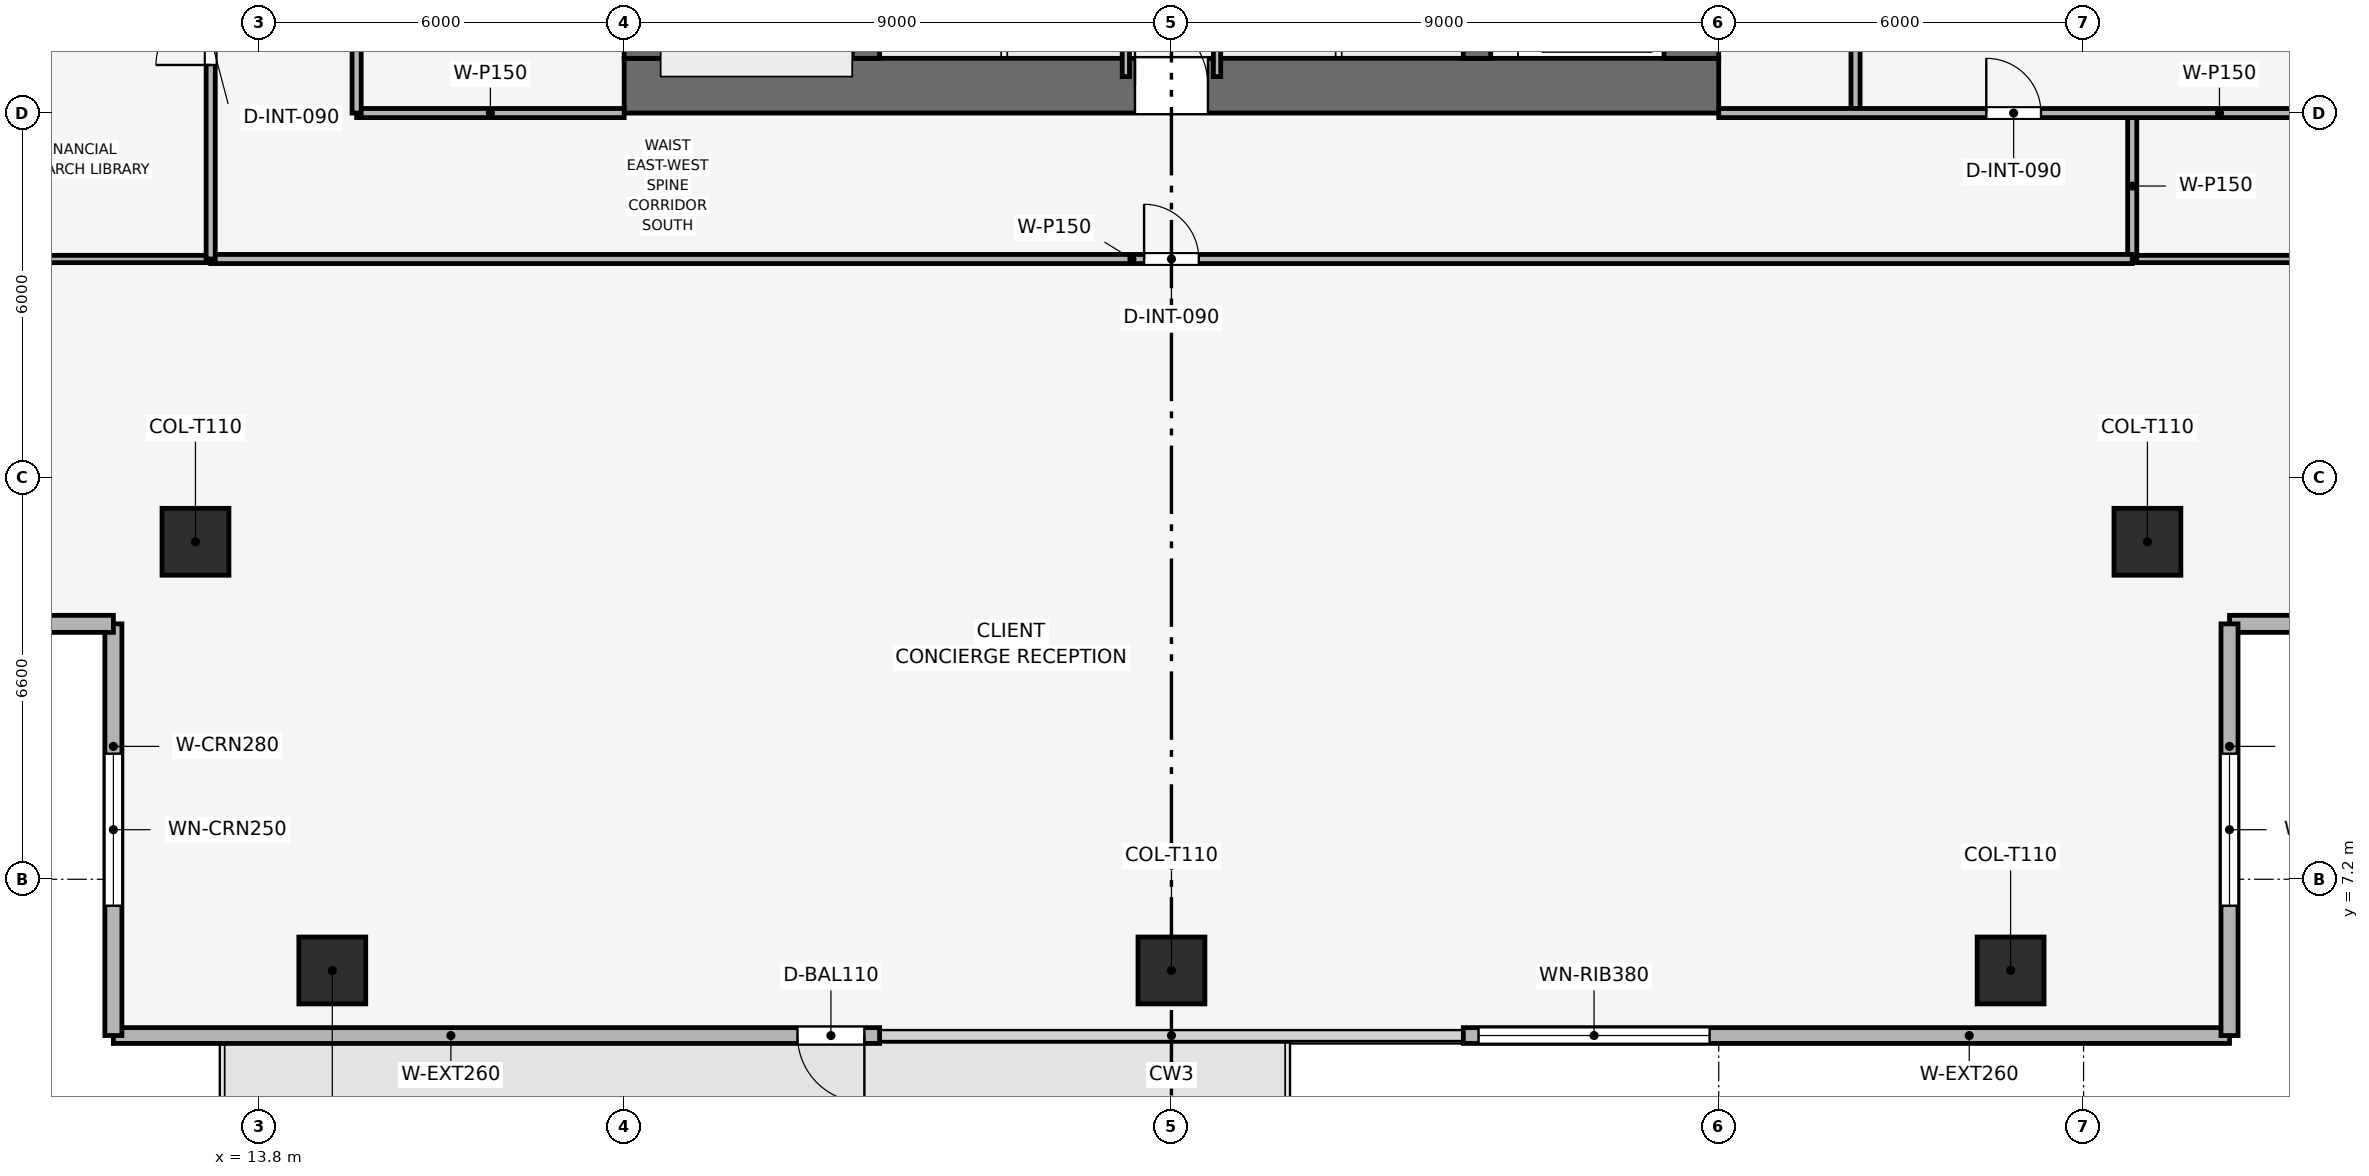
"""IFC4 building model, lengths in metres.
Left out: names, types, materials, properties, quantities, classifications, styles, units other than length and angle.
Written with IfcOpenShell. Run it as: python <this file> out.ifc"""

import sys

from ifc_helpers import new_model, si_unit, direction, frame, frame_2d, origin, origin_2d, place, context, subcontext, project, spatial, rectangle, extrude, element, fill, save


model = new_model("IFC4")
c1 = context("Model", 3, precision=1e-05, world=origin(), true_north=direction((0.0, 1.0)))
c2 = subcontext(c1, "Body", "Model", "MODEL_VIEW")
j1 = project(units=[si_unit("LENGTHUNIT", "METRE"), si_unit("PLANEANGLEUNIT", "RADIAN")], contexts=[c1])
p1 = place(None, origin())
s1 = spatial("IfcSite", under=j1, at=p1, CompositionType="ELEMENT")
p2 = place(p1, origin())
s2 = spatial("IfcBuilding", under=s1, at=p2, CompositionType="ELEMENT")
p3 = place(p2, frame((0.0, 0.0, 172.05)))
s3 = spatial("IfcBuildingStorey", under=s2, at=p3, CompositionType="ELEMENT", Elevation=172.05)
p4 = place(p3, frame((19.8, 20.25, 0.0), z_axis=(0.0, 0.0, 1.0), x_axis=(1.0, 0.0, 0.0)))
e1 = element("IfcWall", 1, at=p4, inside=s3, PredefinedType="SHEAR", context=c2, shape_type="SweptSolid", body=[
    extrude(rectangle(XDim=18.0, YDim=0.9, at=frame_2d((9.0, 0.0))), origin(), (0.0, 0.0, 1.0), 3.75),
])
p5 = place(p4, frame((8.4, 0.0, 0.0)))
e2 = element("IfcOpeningElement", 2, at=p5, cuts=e1, PredefinedType="OPENING", context=c2, shape_type="SweptSolid", body=[
    extrude(rectangle(XDim=1.2, YDim=2.2, at=frame_2d((0.6, 1.1))), frame((0.0, 0.46, 0.0), z_axis=(0.0, -1.0, 0.0), x_axis=(1.0, 0.0, 0.0)), (0.0, 0.0, 1.0), 0.92),
])
p6 = place(p3, frame((20.25, 20.7, 0.0), z_axis=(0.0, 0.0, 1.0), x_axis=(0.0, 1.0, 0.0)))
e3 = element("IfcWall", 3, at=p6, inside=s3, PredefinedType="SHEAR", context=c2, shape_type="SweptSolid", body=[
    extrude(rectangle(XDim=16.2, YDim=0.9, at=frame_2d((8.1, 0.0))), origin(), (0.0, 0.0, 1.0), 3.75),
])
p7 = place(p6, frame((10.1, 0.0, 0.0)))
e4 = element("IfcOpeningElement", 4, at=p7, cuts=e3, PredefinedType="OPENING", context=c2, shape_type="SweptSolid", body=[
    extrude(rectangle(XDim=1.1, YDim=2.15, at=frame_2d((0.55, 1.075))), frame((0.0, 0.46, 0.0), z_axis=(0.0, -1.0, 0.0), x_axis=(1.0, 0.0, 0.0)), (0.0, 0.0, 1.0), 0.92),
])
p8 = place(p3, frame((37.35, 20.7, 0.0), z_axis=(0.0, 0.0, 1.0), x_axis=(0.0, 1.0, 0.0)))
e5 = element("IfcWall", 5, at=p8, inside=s3, PredefinedType="SHEAR", context=c2, shape_type="SweptSolid", body=[
    extrude(rectangle(XDim=16.2, YDim=0.9, at=frame_2d((8.1, 0.0))), origin(), (0.0, 0.0, 1.0), 3.75),
])
p9 = place(p8, frame((4.6, 0.0, 0.0)))
e6 = element("IfcOpeningElement", 6, at=p9, cuts=e5, PredefinedType="OPENING", context=c2, shape_type="SweptSolid", body=[
    extrude(rectangle(XDim=1.1, YDim=2.15, at=frame_2d((0.55, 1.075))), frame((0.0, 0.46, 0.0), z_axis=(0.0, -1.0, 0.0), x_axis=(1.0, 0.0, 0.0)), (0.0, 0.0, 1.0), 0.92),
])
for number, where, z_axis, x_axis in (
    (7, (23.775, 20.7, 0.0), (0.0, 0.0, 1.0), (0.0, 1.0, 0.0)),
    (8, (33.825, 20.7, 0.0), (0.0, 0.0, 1.0), (0.0, 1.0, 0.0)),
):
    element("IfcWall", number, at=place(p3, frame(where, z_axis=z_axis, x_axis=x_axis)), inside=s3, PredefinedType="SHEAR", context=c2, shape_type="SweptSolid", body=[
        extrude(rectangle(XDim=16.2, YDim=0.45, at=frame_2d((8.1, 0.0))), origin(), (0.0, 0.0, 1.0), 3.75),
    ])
for number, where, z_axis, x_axis in (
    (9, (15.0, 5.7, 0.003), (0.0, 0.0, 1.0), (1.0, 0.0, 0.0)),
    (10, (28.8, 5.7, 0.003), (0.0, 0.0, 1.0), (1.0, 0.0, 0.0)),
    (11, (42.6, 5.7, 0.003), (0.0, 0.0, 1.0), (1.0, 0.0, 0.0)),
    (12, (12.75, 12.75, 0.003), (0.0, 0.0, 1.0), (1.0, 0.0, 0.0)),
    (13, (44.85, 12.75, 0.003), (0.0, 0.0, 1.0), (1.0, 0.0, 0.0)),
):
    element("IfcColumn", number, at=place(p3, frame(where, z_axis=z_axis, x_axis=x_axis)), inside=s3, PredefinedType="COLUMN", context=c2, shape_type="SweptSolid", body=[
        extrude(rectangle(XDim=1.1, YDim=1.1, at=origin_2d()), origin(), (0.0, 0.0, 1.0), 3.489),
    ])
p10 = place(p3, frame((46.2, 4.63, 0.0), z_axis=(0.0, 0.0, 1.0), x_axis=(-1.0, 0.0, 0.0)))
e14 = element("IfcWall", 14, at=p10, inside=s3, PredefinedType="SOLIDWALL", context=c2, shape_type="SweptSolid", body=[
    extrude(rectangle(XDim=12.6, YDim=0.26, at=frame_2d((6.3, 0.0))), origin(), (0.0, 0.0, 1.0), 3.495),
])
p11 = place(p10, frame((8.55, 0.0, 0.9)))
e15 = element("IfcOpeningElement", 15, at=p11, cuts=e14, PredefinedType="OPENING", context=c2, shape_type="SweptSolid", body=[
    extrude(rectangle(XDim=3.8, YDim=1.9, at=frame_2d((1.9, 0.95))), frame((0.0, 0.14, 0.0), z_axis=(0.0, -1.0, 0.0), x_axis=(1.0, 0.0, 0.0)), (0.0, 0.0, 1.0), 0.28),
])
p12 = place(p3, frame((24.0, 4.63, 0.0), z_axis=(0.0, 0.0, 1.0), x_axis=(-1.0, 0.0, 0.0)))
e16 = element("IfcWall", 16, at=p12, inside=s3, PredefinedType="SOLIDWALL", context=c2, shape_type="SweptSolid", body=[
    extrude(rectangle(XDim=12.6, YDim=0.26, at=frame_2d((6.3, 0.0))), origin(), (0.0, 0.0, 1.0), 3.495),
])
p13 = place(p12, frame((0.25, 0.0, 0.0)))
e17 = element("IfcOpeningElement", 17, at=p13, cuts=e16, PredefinedType="OPENING", context=c2, shape_type="SweptSolid", body=[
    extrude(rectangle(XDim=1.1, YDim=2.2, at=frame_2d((0.55, 1.1))), frame((0.0, 0.14, 0.0), z_axis=(0.0, -1.0, 0.0), x_axis=(1.0, 0.0, 0.0)), (0.0, 0.0, 1.0), 0.28),
])
p14 = place(p3, frame((11.4, 4.63, 0.0), z_axis=(0.0, 0.0, 1.0), x_axis=(0.0, 1.0, 0.0)))
e18 = element("IfcWall", 18, at=p14, inside=s3, PredefinedType="SOLIDWALL", context=c2, shape_type="SweptSolid", body=[
    extrude(rectangle(XDim=6.77, YDim=0.28, at=frame_2d((3.385, 0.0))), origin(), (0.0, 0.0, 1.0), 3.495),
])
p15 = place(p14, frame((2.135, 0.0, 0.9)))
e19 = element("IfcOpeningElement", 19, at=p15, cuts=e18, PredefinedType="OPENING", context=c2, shape_type="SweptSolid", body=[
    extrude(rectangle(XDim=2.5, YDim=1.9, at=frame_2d((1.25, 0.95))), frame((0.0, 0.15, 0.0), z_axis=(0.0, -1.0, 0.0), x_axis=(1.0, 0.0, 0.0)), (0.0, 0.0, 1.0), 0.3),
])
p16 = place(p3, frame((11.4, 11.4, 0.0), z_axis=(0.0, 0.0, 1.0), x_axis=(-1.0, 0.0, 0.0)))
e20 = element("IfcWall", 20, at=p16, inside=s3, PredefinedType="SOLIDWALL", context=c2, shape_type="SweptSolid", body=[
    extrude(rectangle(XDim=6.77, YDim=0.28, at=frame_2d((3.385, 0.0))), origin(), (0.0, 0.0, 1.0), 3.495),
])
p17 = place(p16, frame((2.135, 0.0, 0.9)))
e21 = element("IfcOpeningElement", 21, at=p17, cuts=e20, PredefinedType="OPENING", context=c2, shape_type="SweptSolid", body=[
    extrude(rectangle(XDim=2.5, YDim=1.9, at=frame_2d((1.25, 0.95))), frame((0.0, 0.15, 0.0), z_axis=(0.0, -1.0, 0.0), x_axis=(1.0, 0.0, 0.0)), (0.0, 0.0, 1.0), 0.3),
])
p18 = place(p3, frame((52.97, 11.4, 0.0), z_axis=(0.0, 0.0, 1.0), x_axis=(-1.0, 0.0, 0.0)))
e22 = element("IfcWall", 22, at=p18, inside=s3, PredefinedType="SOLIDWALL", context=c2, shape_type="SweptSolid", body=[
    extrude(rectangle(XDim=6.77, YDim=0.28, at=frame_2d((3.385, 0.0))), origin(), (0.0, 0.0, 1.0), 3.495),
])
p19 = place(p18, frame((2.135, 0.0, 0.9)))
e23 = element("IfcOpeningElement", 23, at=p19, cuts=e22, PredefinedType="OPENING", context=c2, shape_type="SweptSolid", body=[
    extrude(rectangle(XDim=2.5, YDim=1.9, at=frame_2d((1.25, 0.95))), frame((0.0, 0.15, 0.0), z_axis=(0.0, -1.0, 0.0), x_axis=(1.0, 0.0, 0.0)), (0.0, 0.0, 1.0), 0.3),
])
p20 = place(p3, frame((46.2, 11.4, 0.0), z_axis=(0.0, 0.0, 1.0), x_axis=(0.0, -1.0, 0.0)))
e24 = element("IfcWall", 24, at=p20, inside=s3, PredefinedType="SOLIDWALL", context=c2, shape_type="SweptSolid", body=[
    extrude(rectangle(XDim=6.77, YDim=0.28, at=frame_2d((3.385, 0.0))), origin(), (0.0, 0.0, 1.0), 3.495),
])
p21 = place(p20, frame((2.135, 0.0, 0.9)))
e25 = element("IfcOpeningElement", 25, at=p21, cuts=e24, PredefinedType="OPENING", context=c2, shape_type="SweptSolid", body=[
    extrude(rectangle(XDim=2.5, YDim=1.9, at=frame_2d((1.25, 0.95))), frame((0.0, 0.15, 0.0), z_axis=(0.0, -1.0, 0.0), x_axis=(1.0, 0.0, 0.0)), (0.0, 0.0, 1.0), 0.3),
])
for number, where, z_axis, x_axis in (
    (26, (28.05, 20.4, 0.0), (0.0, 0.0, 1.0), (0.0, 1.0, 0.0)),
    (27, (29.55, 20.4, 0.0), (0.0, 0.0, 1.0), (0.0, 1.0, 0.0)),
):
    element("IfcWall", number, at=place(p3, frame(where, z_axis=z_axis, x_axis=x_axis)), inside=s3, PredefinedType="PARTITIONING", context=c2, shape_type="SweptSolid", body=[
        extrude(rectangle(XDim=2.75, YDim=0.12, at=frame_2d((1.375, 0.0))), origin(), (0.0, 0.0, 1.0), 3.495),
    ])
p22 = place(p3, frame((15.4, 19.8, 0.0), z_axis=(0.0, 0.0, 1.0), x_axis=(1.0, 0.0, 0.0)))
e28 = element("IfcWall", 28, at=p22, inside=s3, PredefinedType="PARTITIONING", context=c2, shape_type="SweptSolid", body=[
    extrude(rectangle(XDim=4.4, YDim=0.15, at=frame_2d((2.2, 0.0))), origin(), (0.0, 0.0, 1.0), 3.03),
])
p23 = place(p3, frame((15.4, 19.8, 0.0), z_axis=(0.0, 0.0, 1.0), x_axis=(0.0, 1.0, 0.0)))
e29 = element("IfcWall", 29, at=p23, inside=s3, PredefinedType="PARTITIONING", context=c2, shape_type="SweptSolid", body=[
    extrude(rectangle(XDim=10.35, YDim=0.15, at=frame_2d((5.175, 0.0))), origin(), (0.0, 0.0, 1.0), 3.03),
])
p24 = place(p23, frame((1.2, 0.0, 0.0)))
e30 = element("IfcOpeningElement", 30, at=p24, cuts=e29, PredefinedType="OPENING", context=c2, shape_type="SweptSolid", body=[
    extrude(rectangle(XDim=0.9, YDim=2.1, at=frame_2d((0.45, 1.05))), frame((0.0, 0.085, 0.0), z_axis=(0.0, -1.0, 0.0), x_axis=(1.0, 0.0, 0.0)), (0.0, 0.0, 1.0), 0.17),
])
p25 = place(p23, frame((4.7, 0.0, 0.0)))
e31 = element("IfcOpeningElement", 31, at=p25, cuts=e29, PredefinedType="OPENING", context=c2, shape_type="SweptSolid", body=[
    extrude(rectangle(XDim=0.9, YDim=2.1, at=frame_2d((0.45, 1.05))), frame((0.0, 0.085, 0.0), z_axis=(0.0, -1.0, 0.0), x_axis=(1.0, 0.0, 0.0)), (0.0, 0.0, 1.0), 0.17),
])
p26 = place(p23, frame((8.1, 0.0, 0.0)))
e32 = element("IfcOpeningElement", 32, at=p26, cuts=e29, PredefinedType="OPENING", context=c2, shape_type="SweptSolid", body=[
    extrude(rectangle(XDim=0.95, YDim=2.1, at=frame_2d((0.475, 1.05))), frame((0.0, 0.085, 0.0), z_axis=(0.0, -1.0, 0.0), x_axis=(1.0, 0.0, 0.0)), (0.0, 0.0, 1.0), 0.17),
])
p27 = place(p3, frame((40.05, 19.8, 0.0), z_axis=(0.0, 0.0, 1.0), x_axis=(0.0, 1.0, 0.0)))
e33 = element("IfcWall", 33, at=p27, inside=s3, PredefinedType="PARTITIONING", context=c2, shape_type="SweptSolid", body=[
    extrude(rectangle(XDim=7.05, YDim=0.15, at=frame_2d((3.525, 0.0))), origin(), (0.0, 0.0, 1.0), 3.03),
])
p28 = place(p3, frame((4.63, 17.4, 0.0), z_axis=(0.0, 0.0, 1.0), x_axis=(1.0, 0.0, 0.0)))
e34 = element("IfcWall", 34, at=p28, inside=s3, PredefinedType="PARTITIONING", context=c2, shape_type="SweptSolid", body=[
    extrude(rectangle(XDim=8.37, YDim=0.12, at=frame_2d((4.185, 0.0))), origin(), (0.0, 0.0, 1.0), 2.98),
])
p29 = place(p3, frame((44.6, 17.4, 0.0), z_axis=(0.0, 0.0, 1.0), x_axis=(1.0, 0.0, 0.0)))
e35 = element("IfcWall", 35, at=p29, inside=s3, PredefinedType="PARTITIONING", context=c2, shape_type="SweptSolid", body=[
    extrude(rectangle(XDim=8.37, YDim=0.12, at=frame_2d((4.185, 0.0))), origin(), (0.0, 0.0, 1.0), 2.98),
])
p30 = place(p3, frame((44.6, 17.4, 0.0), z_axis=(0.0, 0.0, 1.0), x_axis=(0.0, 1.0, 0.0)))
e36 = element("IfcWall", 36, at=p30, inside=s3, PredefinedType="PARTITIONING", context=c2, shape_type="SweptSolid", body=[
    extrude(rectangle(XDim=2.4, YDim=0.15, at=frame_2d((1.2, 0.0))), origin(), (0.0, 0.0, 1.0), 3.495),
])
p31 = place(p3, frame((37.8, 19.8, 0.0), z_axis=(0.0, 0.0, 1.0), x_axis=(1.0, 0.0, 0.0)))
e37 = element("IfcWall", 37, at=p31, inside=s3, PredefinedType="PARTITIONING", context=c2, shape_type="SweptSolid", body=[
    extrude(rectangle(XDim=15.17, YDim=0.15, at=frame_2d((7.585, 0.0))), origin(), (0.0, 0.0, 1.0), 2.98),
])
p32 = place(p31, frame((4.4, 0.0, 0.0)))
e38 = element("IfcOpeningElement", 38, at=p32, cuts=e37, PredefinedType="OPENING", context=c2, shape_type="SweptSolid", body=[
    extrude(rectangle(XDim=0.9, YDim=2.1, at=frame_2d((0.45, 1.05))), frame((0.0, 0.085, 0.0), z_axis=(0.0, -1.0, 0.0), x_axis=(1.0, 0.0, 0.0)), (0.0, 0.0, 1.0), 0.17),
])
p33 = place(p3, frame((13.0, 17.4, 0.0), z_axis=(0.0, 0.0, 1.0), x_axis=(1.0, 0.0, 0.0)))
e39 = element("IfcWall", 39, at=p33, inside=s3, PredefinedType="PARTITIONING", context=c2, shape_type="SweptSolid", body=[
    extrude(rectangle(XDim=31.6, YDim=0.15, at=frame_2d((15.8, 0.0))), origin(), (0.0, 0.0, 1.0), 3.03),
])
p34 = place(p33, frame((15.35, 0.0, 0.0)))
e40 = element("IfcOpeningElement", 40, at=p34, cuts=e39, PredefinedType="OPENING", context=c2, shape_type="SweptSolid", body=[
    extrude(rectangle(XDim=0.9, YDim=2.1, at=frame_2d((0.45, 1.05))), frame((0.0, 0.085, 0.0), z_axis=(0.0, -1.0, 0.0), x_axis=(1.0, 0.0, 0.0)), (0.0, 0.0, 1.0), 0.17),
])
p35 = place(p3, frame((13.0, 17.4, 0.0), z_axis=(0.0, 0.0, 1.0), x_axis=(0.0, 1.0, 0.0)))
e41 = element("IfcWall", 41, at=p35, inside=s3, PredefinedType="PARTITIONING", context=c2, shape_type="SweptSolid", body=[
    extrude(rectangle(XDim=22.8, YDim=0.15, at=frame_2d((11.4, 0.0))), origin(), (0.0, 0.0, 1.0), 3.03),
])
p36 = place(p35, frame((3.191, 0.0, 0.0)))
e42 = element("IfcOpeningElement", 42, at=p36, cuts=e41, PredefinedType="OPENING", context=c2, shape_type="SweptSolid", body=[
    extrude(rectangle(XDim=0.9, YDim=2.1, at=frame_2d((0.45, 1.05))), frame((0.0, 0.085, 0.0), z_axis=(0.0, -1.0, 0.0), x_axis=(1.0, 0.0, 0.0)), (0.0, 0.0, 1.0), 0.17),
])
p37 = place(p35, frame((6.581, 0.0, 0.0)))
e43 = element("IfcOpeningElement", 43, at=p37, cuts=e41, PredefinedType="OPENING", context=c2, shape_type="SweptSolid", body=[
    extrude(rectangle(XDim=0.9, YDim=2.1, at=frame_2d((0.45, 1.05))), frame((0.0, 0.085, 0.0), z_axis=(0.0, -1.0, 0.0), x_axis=(1.0, 0.0, 0.0)), (0.0, 0.0, 1.0), 0.17),
])
p38 = place(p35, frame((10.878, 0.0, 0.0)))
e44 = element("IfcOpeningElement", 44, at=p38, cuts=e41, PredefinedType="OPENING", context=c2, shape_type="SweptSolid", body=[
    extrude(rectangle(XDim=0.9, YDim=2.1, at=frame_2d((0.45, 1.05))), frame((0.0, 0.085, 0.0), z_axis=(0.0, -1.0, 0.0), x_axis=(1.0, 0.0, 0.0)), (0.0, 0.0, 1.0), 0.17),
])
p39 = place(p35, frame((16.488, 0.0, 0.0)))
e45 = element("IfcOpeningElement", 45, at=p39, cuts=e41, PredefinedType="OPENING", context=c2, shape_type="SweptSolid", body=[
    extrude(rectangle(XDim=0.9, YDim=2.1, at=frame_2d((0.45, 1.05))), frame((0.0, 0.085, 0.0), z_axis=(0.0, -1.0, 0.0), x_axis=(1.0, 0.0, 0.0)), (0.0, 0.0, 1.0), 0.17),
])
p40 = place(p13, origin())
e46 = element("IfcDoor", 46, at=p40, inside=s3, OperationType="SINGLE_SWING_LEFT", PredefinedType="DOOR", context=c2, shape_type="SweptSolid", body=[
    extrude(rectangle(XDim=1.1, YDim=2.2, at=frame_2d((0.55, 1.1))), frame((0.0, 0.025, 0.0), z_axis=(0.0, -1.0, 0.0), x_axis=(1.0, 0.0, 0.0)), (0.0, 0.0, 1.0), 0.05),
])
fill(e17, e46)
p41 = place(p11, origin())
e47 = element("IfcWindow", 47, at=p41, inside=s3, PartitioningType="SINGLE_PANEL", PredefinedType="WINDOW", context=c2, shape_type="SweptSolid", body=[
    extrude(rectangle(XDim=3.8, YDim=1.9, at=frame_2d((1.9, 0.95))), frame((0.0, 0.03, 0.0), z_axis=(0.0, -1.0, 0.0), x_axis=(1.0, 0.0, 0.0)), (0.0, 0.0, 1.0), 0.06),
])
fill(e15, e47)
p42 = place(p15, origin())
e48 = element("IfcWindow", 48, at=p42, inside=s3, PartitioningType="SINGLE_PANEL", PredefinedType="WINDOW", context=c2, shape_type="SweptSolid", body=[
    extrude(rectangle(XDim=2.5, YDim=1.9, at=frame_2d((1.25, 0.95))), frame((0.0, 0.03, 0.0), z_axis=(0.0, -1.0, 0.0), x_axis=(1.0, 0.0, 0.0)), (0.0, 0.0, 1.0), 0.06),
])
fill(e19, e48)
p43 = place(p21, origin())
e49 = element("IfcWindow", 49, at=p43, inside=s3, PartitioningType="SINGLE_PANEL", PredefinedType="WINDOW", context=c2, shape_type="SweptSolid", body=[
    extrude(rectangle(XDim=2.5, YDim=1.9, at=frame_2d((1.25, 0.95))), frame((0.0, 0.03, 0.0), z_axis=(0.0, -1.0, 0.0), x_axis=(1.0, 0.0, 0.0)), (0.0, 0.0, 1.0), 0.06),
])
fill(e25, e49)
p44 = place(p32, origin())
e50 = element("IfcDoor", 50, at=p44, inside=s3, OperationType="SINGLE_SWING_LEFT", PredefinedType="DOOR", context=c2, shape_type="SweptSolid", body=[
    extrude(rectangle(XDim=0.9, YDim=2.1, at=frame_2d((0.45, 1.05))), frame((0.0, 0.025, 0.0), z_axis=(0.0, -1.0, 0.0), x_axis=(1.0, 0.0, 0.0)), (0.0, 0.0, 1.0), 0.05),
])
fill(e38, e50)
p45 = place(p34, origin())
e51 = element("IfcDoor", 51, at=p45, inside=s3, OperationType="SINGLE_SWING_LEFT", PredefinedType="DOOR", context=c2, shape_type="SweptSolid", body=[
    extrude(rectangle(XDim=0.9, YDim=2.1, at=frame_2d((0.45, 1.05))), frame((0.0, 0.025, 0.0), z_axis=(0.0, -1.0, 0.0), x_axis=(1.0, 0.0, 0.0)), (0.0, 0.0, 1.0), 0.05),
])
fill(e40, e51)
p46 = place(p36, origin())
e52 = element("IfcDoor", 52, at=p46, inside=s3, OperationType="SINGLE_SWING_LEFT", PredefinedType="DOOR", context=c2, shape_type="SweptSolid", body=[
    extrude(rectangle(XDim=0.9, YDim=2.1, at=frame_2d((0.45, 1.05))), frame((0.0, 0.025, 0.0), z_axis=(0.0, -1.0, 0.0), x_axis=(1.0, 0.0, 0.0)), (0.0, 0.0, 1.0), 0.05),
])
fill(e42, e52)
p47 = place(p5, origin())
e53 = element("IfcDoor", 53, at=p47, inside=s3, OperationType="SINGLE_SWING_LEFT", PredefinedType="DOOR", context=c2, shape_type="SweptSolid", body=[
    extrude(rectangle(XDim=1.2, YDim=2.2, at=frame_2d((0.6, 1.1))), frame((0.0, 0.025, 0.0), z_axis=(0.0, -1.0, 0.0), x_axis=(1.0, 0.0, 0.0)), (0.0, 0.0, 1.0), 0.05),
])
fill(e2, e53)
save(model, sys.argv[1])
